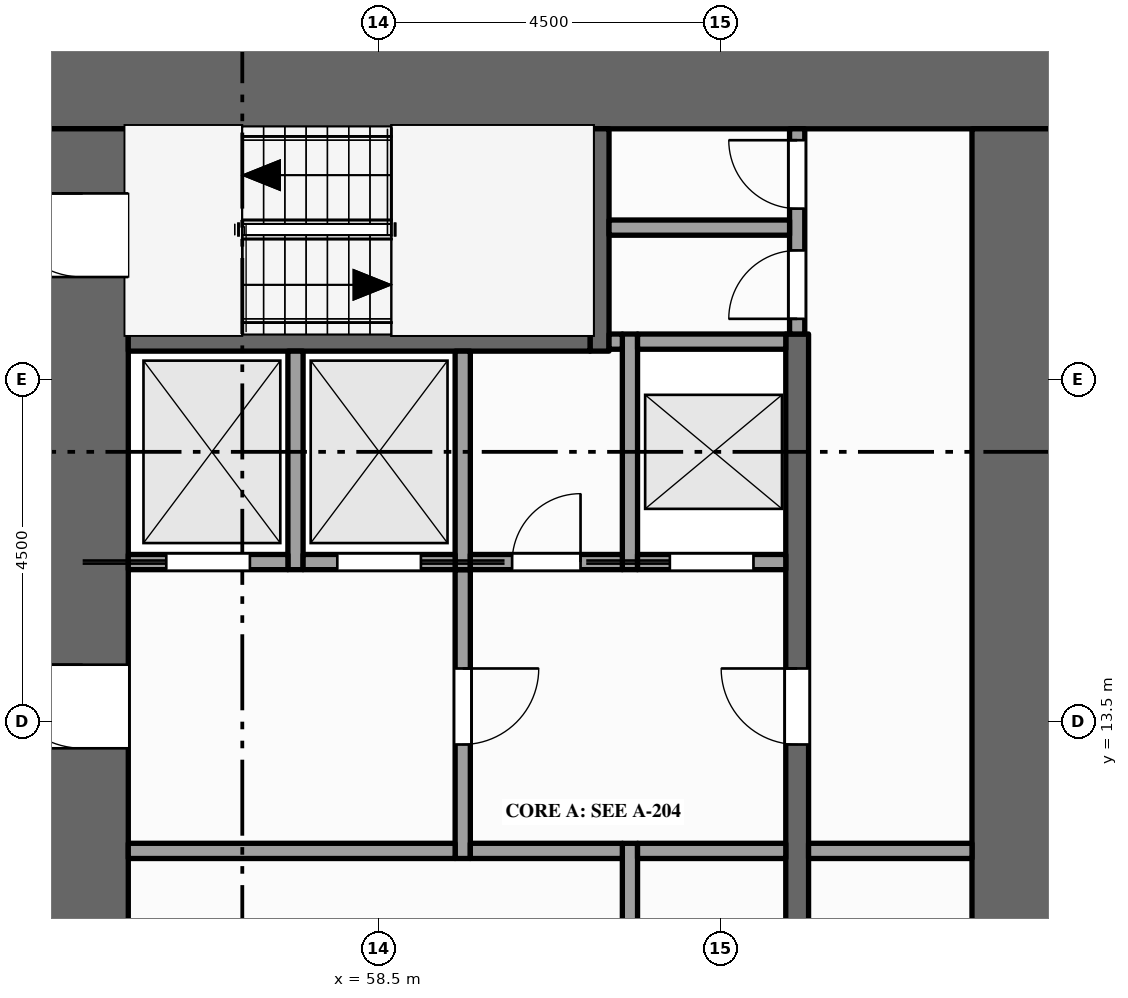
"""IFC4 building model, lengths in metres.
Left out: names, types, materials, properties, quantities, classifications, styles, units other than length and angle.
Written with IfcOpenShell. Run it as: python <this file> out.ifc"""

import sys

from ifc_helpers import new_model, si_unit, direction, frame, frame_2d, origin, place, context, subcontext, project, spatial, rectangle, extrude, element, fill, save


model = new_model("IFC4")
c1 = context("Model", 3, precision=1e-05, world=origin(), true_north=direction((0.0, 1.0)))
c2 = subcontext(c1, "Body", "Model", "MODEL_VIEW")
j1 = project(units=[si_unit("LENGTHUNIT", "METRE"), si_unit("PLANEANGLEUNIT", "RADIAN")], contexts=[c1])
p1 = place(None, origin())
s1 = spatial("IfcSite", under=j1, at=p1, CompositionType="ELEMENT")
p2 = place(p1, origin())
s2 = spatial("IfcBuilding", under=s1, at=p2, CompositionType="ELEMENT")
p3 = place(p2, frame((0.0, 0.0, 19.0)))
s3 = spatial("IfcBuildingStorey", under=s2, at=p3, CompositionType="ELEMENT", Elevation=19.0)
p4 = place(p3, frame((54.0, 21.9, -0.15), z_axis=(0.0, 0.0, 1.0), x_axis=(1.0, 0.0, 0.0)))
e1 = element("IfcWall", 1, at=p4, inside=s3, PredefinedType="SHEAR", context=c2, shape_type="SweptSolid", body=[
    extrude(rectangle(XDim=13.5, YDim=1.2, at=frame_2d((6.75, 0.0))), origin(), (0.0, 0.0, 1.0), 5.0),
])
p5 = place(p3, frame((54.6, 1.2, -0.15), z_axis=(0.0, 0.0, 1.0), x_axis=(0.0, 1.0, 0.0)))
e2 = element("IfcWall", 2, at=p5, inside=s3, PredefinedType="SHEAR", context=c2, shape_type="SweptSolid", body=[
    extrude(rectangle(XDim=20.1, YDim=1.2, at=frame_2d((10.05, 0.0))), origin(), (0.0, 0.0, 1.0), 5.0),
])
p6 = place(p5, frame((5.9, 0.0, 0.15)))
e3 = element("IfcOpeningElement", 3, at=p6, cuts=e2, PredefinedType="OPENING", context=c2, shape_type="SweptSolid", body=[
    extrude(rectangle(XDim=1.8, YDim=2.1, at=frame_2d((0.9, 1.05))), frame((0.0, 0.61, 0.0), z_axis=(0.0, -1.0, 0.0), x_axis=(1.0, 0.0, 0.0)), (0.0, 0.0, 1.0), 1.22),
])
p7 = place(p5, frame((11.95, 0.0, 0.15)))
e4 = element("IfcOpeningElement", 4, at=p7, cuts=e2, PredefinedType="OPENING", context=c2, shape_type="SweptSolid", body=[
    extrude(rectangle(XDim=1.1, YDim=2.1, at=frame_2d((0.55, 1.05))), frame((0.0, 0.61, 0.0), z_axis=(0.0, -1.0, 0.0), x_axis=(1.0, 0.0, 0.0)), (0.0, 0.0, 1.0), 1.22),
])
p8 = place(p5, frame((0.95, 0.0, 0.15)))
e5 = element("IfcOpeningElement", 5, at=p8, cuts=e2, PredefinedType="OPENING", context=c2, shape_type="SweptSolid", body=[
    extrude(rectangle(XDim=1.1, YDim=2.1, at=frame_2d((0.55, 1.05))), frame((0.0, 0.61, 0.0), z_axis=(0.0, -1.0, 0.0), x_axis=(1.0, 0.0, 0.0)), (0.0, 0.0, 1.0), 1.22),
])
p9 = place(p5, frame((18.15, 0.0, 0.15)))
e6 = element("IfcOpeningElement", 6, at=p9, cuts=e2, PredefinedType="OPENING", context=c2, shape_type="SweptSolid", body=[
    extrude(rectangle(XDim=1.1, YDim=2.1, at=frame_2d((0.55, 1.05))), frame((0.0, 0.61, 0.0), z_axis=(0.0, -1.0, 0.0), x_axis=(1.0, 0.0, 0.0)), (0.0, 0.0, 1.0), 1.22),
])
p10 = place(p3, frame((66.9, 1.2, -0.15), z_axis=(0.0, 0.0, 1.0), x_axis=(0.0, 1.0, 0.0)))
e7 = element("IfcWall", 7, at=p10, inside=s3, PredefinedType="SHEAR", context=c2, shape_type="SweptSolid", body=[
    extrude(rectangle(XDim=20.1, YDim=1.2, at=frame_2d((10.05, 0.0))), origin(), (0.0, 0.0, 1.0), 5.0),
])
p11 = place(p3, frame((57.4, 15.5, 0.0), z_axis=(0.0, 0.0, 1.0), x_axis=(0.0, 1.0, 0.0)))
e8 = element("IfcWall", 8, at=p11, inside=s3, PredefinedType="SOLIDWALL", context=c2, shape_type="SweptSolid", body=[
    extrude(rectangle(XDim=2.875, YDim=0.2, at=frame_2d((1.438, 0.0))), origin(), (0.0, 0.0, 1.0), 4.75),
])
p12 = place(p3, frame((59.6, 11.7, 0.0), z_axis=(0.0, 0.0, 1.0), x_axis=(0.0, 1.0, 0.0)))
e9 = element("IfcWall", 9, at=p12, inside=s3, PredefinedType="PARTITIONING", context=c2, shape_type="SweptSolid", body=[
    extrude(rectangle(XDim=3.8, YDim=0.2, at=frame_2d((1.9, 0.0))), origin(), (0.0, 0.0, 1.0), 4.75),
])
p13 = place(p12, frame((1.5, 0.0, 0.0)))
e10 = element("IfcOpeningElement", 10, at=p13, cuts=e9, PredefinedType="OPENING", context=c2, shape_type="SweptSolid", body=[
    extrude(rectangle(XDim=1.0, YDim=2.1, at=frame_2d((0.5, 1.05))), frame((0.0, 0.11, 0.0), z_axis=(0.0, -1.0, 0.0), x_axis=(1.0, 0.0, 0.0)), (0.0, 0.0, 1.0), 0.22),
])
p14 = place(p3, frame((59.6, 15.5, 0.0), z_axis=(0.0, 0.0, 1.0), x_axis=(0.0, 1.0, 0.0)))
e11 = element("IfcWall", 11, at=p14, inside=s3, PredefinedType="SOLIDWALL", context=c2, shape_type="SweptSolid", body=[
    extrude(rectangle(XDim=2.875, YDim=0.2, at=frame_2d((1.438, 0.0))), origin(), (0.0, 0.0, 1.0), 4.75),
])
p15 = place(p3, frame((61.4, 18.375, 0.0), z_axis=(0.0, 0.0, 1.0), x_axis=(0.0, 1.0, 0.0)))
e12 = element("IfcWall", 12, at=p15, inside=s3, PredefinedType="SHEAR", context=c2, shape_type="SweptSolid", body=[
    extrude(rectangle(XDim=2.925, YDim=0.25, at=frame_2d((1.462, 0.0))), origin(), (0.0, 0.0, 1.0), 4.75),
])
p16 = place(p3, frame((61.8, 9.3, 0.0), z_axis=(0.0, 0.0, 1.0), x_axis=(0.0, 1.0, 0.0)))
e13 = element("IfcWall", 13, at=p16, inside=s3, PredefinedType="PARTITIONING", context=c2, shape_type="SweptSolid", body=[
    extrude(rectangle(XDim=2.6, YDim=0.2, at=frame_2d((1.3, 0.0))), origin(), (0.0, 0.0, 1.0), 4.75),
])
p17 = place(p3, frame((61.8, 15.5, 0.0), z_axis=(0.0, 0.0, 1.0), x_axis=(0.0, 1.0, 0.0)))
e14 = element("IfcWall", 14, at=p17, inside=s3, PredefinedType="SOLIDWALL", context=c2, shape_type="SweptSolid", body=[
    extrude(rectangle(XDim=3.1, YDim=0.2, at=frame_2d((1.55, 0.0))), origin(), (0.0, 0.0, 1.0), 4.75),
])
p18 = place(p3, frame((64.0, 4.1, 0.0), z_axis=(0.0, 0.0, 1.0), x_axis=(0.0, 1.0, 0.0)))
e15 = element("IfcWall", 15, at=p18, inside=s3, PredefinedType="SHEAR", context=c2, shape_type="SweptSolid", body=[
    extrude(rectangle(XDim=14.5, YDim=0.3, at=frame_2d((7.25, 0.0))), origin(), (0.0, 0.0, 1.0), 4.75),
])
p19 = place(p18, frame((3.4, 0.0, 0.0)))
e16 = element("IfcOpeningElement", 16, at=p19, cuts=e15, PredefinedType="OPENING", context=c2, shape_type="SweptSolid", body=[
    extrude(rectangle(XDim=1.0, YDim=2.1, at=frame_2d((0.5, 1.05))), frame((0.0, 0.16, 0.0), z_axis=(0.0, -1.0, 0.0), x_axis=(1.0, 0.0, 0.0)), (0.0, 0.0, 1.0), 0.32),
])
p20 = place(p18, frame((9.1, 0.0, 0.0)))
e17 = element("IfcOpeningElement", 17, at=p20, cuts=e15, PredefinedType="OPENING", context=c2, shape_type="SweptSolid", body=[
    extrude(rectangle(XDim=1.0, YDim=2.1, at=frame_2d((0.5, 1.05))), frame((0.0, 0.16, 0.0), z_axis=(0.0, -1.0, 0.0), x_axis=(1.0, 0.0, 0.0)), (0.0, 0.0, 1.0), 0.32),
])
p21 = place(p3, frame((64.0, 18.6, 0.0), z_axis=(0.0, 0.0, 1.0), x_axis=(0.0, 1.0, 0.0)))
e18 = element("IfcWall", 18, at=p21, inside=s3, PredefinedType="PARTITIONING", context=c2, shape_type="SweptSolid", body=[
    extrude(rectangle(XDim=2.7, YDim=0.2, at=frame_2d((1.35, 0.0))), origin(), (0.0, 0.0, 1.0), 4.75),
])
p22 = place(p21, frame((0.2, 0.0, 0.0)))
e19 = element("IfcOpeningElement", 19, at=p22, cuts=e18, PredefinedType="OPENING", context=c2, shape_type="SweptSolid", body=[
    extrude(rectangle(XDim=0.9, YDim=2.1, at=frame_2d((0.45, 1.05))), frame((0.0, 0.11, 0.0), z_axis=(0.0, -1.0, 0.0), x_axis=(1.0, 0.0, 0.0)), (0.0, 0.0, 1.0), 0.22),
])
p23 = place(p21, frame((1.65, 0.0, 0.0)))
e20 = element("IfcOpeningElement", 20, at=p23, cuts=e18, PredefinedType="OPENING", context=c2, shape_type="SweptSolid", body=[
    extrude(rectangle(XDim=0.9, YDim=2.1, at=frame_2d((0.45, 1.05))), frame((0.0, 0.11, 0.0), z_axis=(0.0, -1.0, 0.0), x_axis=(1.0, 0.0, 0.0)), (0.0, 0.0, 1.0), 0.22),
])
p24 = place(p3, frame((55.2, 11.8, 0.0), z_axis=(0.0, 0.0, 1.0), x_axis=(1.0, 0.0, 0.0)))
e21 = element("IfcWall", 21, at=p24, inside=s3, PredefinedType="PARTITIONING", context=c2, shape_type="SweptSolid", body=[
    extrude(rectangle(XDim=4.3, YDim=0.2, at=frame_2d((2.15, 0.0))), origin(), (0.0, 0.0, 1.0), 4.75),
])
p25 = place(p3, frame((59.7, 11.8, 0.0), z_axis=(0.0, 0.0, 1.0), x_axis=(1.0, 0.0, 0.0)))
e22 = element("IfcWall", 22, at=p25, inside=s3, PredefinedType="PARTITIONING", context=c2, shape_type="SweptSolid", body=[
    extrude(rectangle(XDim=2.0, YDim=0.2, at=frame_2d((1.0, 0.0))), origin(), (0.0, 0.0, 1.0), 4.75),
])
p26 = place(p3, frame((61.9, 11.8, 0.0), z_axis=(0.0, 0.0, 1.0), x_axis=(1.0, 0.0, 0.0)))
e23 = element("IfcWall", 23, at=p26, inside=s3, PredefinedType="PARTITIONING", context=c2, shape_type="SweptSolid", body=[
    extrude(rectangle(XDim=1.95, YDim=0.2, at=frame_2d((0.975, 0.0))), origin(), (0.0, 0.0, 1.0), 4.75),
])
p27 = place(p3, frame((64.15, 11.8, 0.0), z_axis=(0.0, 0.0, 1.0), x_axis=(1.0, 0.0, 0.0)))
e24 = element("IfcWall", 24, at=p27, inside=s3, PredefinedType="PARTITIONING", context=c2, shape_type="SweptSolid", body=[
    extrude(rectangle(XDim=2.15, YDim=0.2, at=frame_2d((1.075, 0.0))), origin(), (0.0, 0.0, 1.0), 4.75),
])
p28 = place(p3, frame((55.2, 15.6, 0.0), z_axis=(0.0, 0.0, 1.0), x_axis=(1.0, 0.0, 0.0)))
e25 = element("IfcWall", 25, at=p28, inside=s3, PredefinedType="SOLIDWALL", context=c2, shape_type="SweptSolid", body=[
    extrude(rectangle(XDim=2.1, YDim=0.2, at=frame_2d((1.05, 0.0))), origin(), (0.0, 0.0, 1.0), 4.75),
])
p29 = place(p28, frame((0.5, 0.0, 0.012)))
e26 = element("IfcOpeningElement", 26, at=p29, cuts=e25, PredefinedType="OPENING", context=c2, shape_type="SweptSolid", body=[
    extrude(rectangle(XDim=1.1, YDim=2.1, at=frame_2d((0.55, 1.05))), frame((0.0, 0.11, 0.0), z_axis=(0.0, -1.0, 0.0), x_axis=(1.0, 0.0, 0.0)), (0.0, 0.0, 1.0), 0.22),
])
p30 = place(p3, frame((57.5, 15.6, 0.0), z_axis=(0.0, 0.0, 1.0), x_axis=(1.0, 0.0, 0.0)))
e27 = element("IfcWall", 27, at=p30, inside=s3, PredefinedType="SOLIDWALL", context=c2, shape_type="SweptSolid", body=[
    extrude(rectangle(XDim=2.0, YDim=0.2, at=frame_2d((1.0, 0.0))), origin(), (0.0, 0.0, 1.0), 4.75),
])
p31 = place(p30, frame((0.45, 0.0, 0.012)))
e28 = element("IfcOpeningElement", 28, at=p31, cuts=e27, PredefinedType="OPENING", context=c2, shape_type="SweptSolid", body=[
    extrude(rectangle(XDim=1.1, YDim=2.1, at=frame_2d((0.55, 1.05))), frame((0.0, 0.11, 0.0), z_axis=(0.0, -1.0, 0.0), x_axis=(1.0, 0.0, 0.0)), (0.0, 0.0, 1.0), 0.22),
])
p32 = place(p3, frame((59.7, 15.6, 0.0), z_axis=(0.0, 0.0, 1.0), x_axis=(1.0, 0.0, 0.0)))
e29 = element("IfcWall", 29, at=p32, inside=s3, PredefinedType="PARTITIONING", context=c2, shape_type="SweptSolid", body=[
    extrude(rectangle(XDim=2.0, YDim=0.2, at=frame_2d((1.0, 0.0))), origin(), (0.0, 0.0, 1.0), 4.75),
])
p33 = place(p32, frame((0.55, 0.0, 0.0)))
e30 = element("IfcOpeningElement", 30, at=p33, cuts=e29, PredefinedType="OPENING", context=c2, shape_type="SweptSolid", body=[
    extrude(rectangle(XDim=0.9, YDim=2.1, at=frame_2d((0.45, 1.05))), frame((0.0, 0.11, 0.0), z_axis=(0.0, -1.0, 0.0), x_axis=(1.0, 0.0, 0.0)), (0.0, 0.0, 1.0), 0.22),
])
p34 = place(p3, frame((61.9, 15.6, 0.0), z_axis=(0.0, 0.0, 1.0), x_axis=(1.0, 0.0, 0.0)))
e31 = element("IfcWall", 31, at=p34, inside=s3, PredefinedType="SOLIDWALL", context=c2, shape_type="SweptSolid", body=[
    extrude(rectangle(XDim=1.95, YDim=0.2, at=frame_2d((0.975, 0.0))), origin(), (0.0, 0.0, 1.0), 4.75),
])
p35 = place(p34, frame((0.425, 0.0, 0.012)))
e32 = element("IfcOpeningElement", 32, at=p35, cuts=e31, PredefinedType="OPENING", context=c2, shape_type="SweptSolid", body=[
    extrude(rectangle(XDim=1.1, YDim=2.1, at=frame_2d((0.55, 1.05))), frame((0.0, 0.11, 0.0), z_axis=(0.0, -1.0, 0.0), x_axis=(1.0, 0.0, 0.0)), (0.0, 0.0, 1.0), 0.22),
])
p36 = place(p3, frame((55.2, 18.5, 0.0), z_axis=(0.0, 0.0, 1.0), x_axis=(1.0, 0.0, 0.0)))
e33 = element("IfcWall", 33, at=p36, inside=s3, PredefinedType="SHEAR", context=c2, shape_type="SweptSolid", body=[
    extrude(rectangle(XDim=6.075, YDim=0.25, at=frame_2d((3.038, 0.0))), origin(), (0.0, 0.0, 1.0), 4.75),
])
p37 = place(p3, frame((61.525, 18.5, 0.0), z_axis=(0.0, 0.0, 1.0), x_axis=(1.0, 0.0, 0.0)))
e34 = element("IfcWall", 34, at=p37, inside=s3, PredefinedType="PARTITIONING", context=c2, shape_type="SweptSolid", body=[
    extrude(rectangle(XDim=0.175, YDim=0.2, at=frame_2d((0.087, 0.0))), origin(), (0.0, 0.0, 1.0), 4.75),
])
p38 = place(p3, frame((61.9, 18.5, 0.0), z_axis=(0.0, 0.0, 1.0), x_axis=(1.0, 0.0, 0.0)))
e35 = element("IfcWall", 35, at=p38, inside=s3, PredefinedType="SOLIDWALL", context=c2, shape_type="SweptSolid", body=[
    extrude(rectangle(XDim=1.95, YDim=0.2, at=frame_2d((0.975, 0.0))), origin(), (0.0, 0.0, 1.0), 4.75),
])
p39 = place(p3, frame((61.525, 20.0, 0.0), z_axis=(0.0, 0.0, 1.0), x_axis=(1.0, 0.0, 0.0)))
e36 = element("IfcWall", 36, at=p39, inside=s3, PredefinedType="PARTITIONING", context=c2, shape_type="SweptSolid", body=[
    extrude(rectangle(XDim=2.375, YDim=0.2, at=frame_2d((1.188, 0.0))), origin(), (0.0, 0.0, 1.0), 4.75),
])
p40 = place(p29, origin())
e37 = element("IfcDoor", 37, at=p40, inside=s3, OperationType="SLIDING_TO_LEFT", PredefinedType="DOOR", context=c2, shape_type="SweptSolid", body=[
    extrude(rectangle(XDim=1.1, YDim=2.1, at=frame_2d((0.55, 1.05))), frame((0.0, 0.025, 0.0), z_axis=(0.0, -1.0, 0.0), x_axis=(1.0, 0.0, 0.0)), (0.0, 0.0, 1.0), 0.05),
])
fill(e26, e37)
p41 = place(p31, origin())
e38 = element("IfcDoor", 38, at=p41, inside=s3, OperationType="SLIDING_TO_RIGHT", PredefinedType="DOOR", context=c2, shape_type="SweptSolid", body=[
    extrude(rectangle(XDim=1.1, YDim=2.1, at=frame_2d((0.55, 1.05))), frame((0.0, 0.025, 0.0), z_axis=(0.0, -1.0, 0.0), x_axis=(1.0, 0.0, 0.0)), (0.0, 0.0, 1.0), 0.05),
])
fill(e28, e38)
p42 = place(p35, origin())
e39 = element("IfcDoor", 39, at=p42, inside=s3, OperationType="SLIDING_TO_LEFT", PredefinedType="DOOR", context=c2, shape_type="SweptSolid", body=[
    extrude(rectangle(XDim=1.1, YDim=2.1, at=frame_2d((0.55, 1.05))), frame((0.0, 0.025, 0.0), z_axis=(0.0, -1.0, 0.0), x_axis=(1.0, 0.0, 0.0)), (0.0, 0.0, 1.0), 0.05),
])
fill(e32, e39)
p43 = place(p7, origin())
e40 = element("IfcDoor", 40, at=p43, inside=s3, OperationType="SINGLE_SWING_RIGHT", PredefinedType="DOOR", context=c2, shape_type="SweptSolid", body=[
    extrude(rectangle(XDim=1.1, YDim=2.1, at=frame_2d((0.55, 1.05))), frame((0.0, 0.025, 0.0), z_axis=(0.0, -1.0, 0.0), x_axis=(1.0, 0.0, 0.0)), (0.0, 0.0, 1.0), 0.05),
])
fill(e4, e40)
p44 = place(p13, origin())
e41 = element("IfcDoor", 41, at=p44, inside=s3, OperationType="SINGLE_SWING_RIGHT", PredefinedType="DOOR", context=c2, shape_type="SweptSolid", body=[
    extrude(rectangle(XDim=1.0, YDim=2.1, at=frame_2d((0.5, 1.05))), frame((0.0, 0.025, 0.0), z_axis=(0.0, -1.0, 0.0), x_axis=(1.0, 0.0, 0.0)), (0.0, 0.0, 1.0), 0.05),
])
fill(e10, e41)
p45 = place(p20, origin())
e42 = element("IfcDoor", 42, at=p45, inside=s3, OperationType="SINGLE_SWING_RIGHT", PredefinedType="DOOR", context=c2, shape_type="SweptSolid", body=[
    extrude(rectangle(XDim=1.0, YDim=2.1, at=frame_2d((0.5, 1.05))), frame((0.0, 0.025, 0.0), z_axis=(0.0, -1.0, 0.0), x_axis=(1.0, 0.0, 0.0)), (0.0, 0.0, 1.0), 0.05),
])
fill(e17, e42)
p46 = place(p9, origin())
e43 = element("IfcDoor", 43, at=p46, inside=s3, OperationType="SINGLE_SWING_RIGHT", PredefinedType="DOOR", context=c2, shape_type="SweptSolid", body=[
    extrude(rectangle(XDim=1.1, YDim=2.1, at=frame_2d((0.55, 1.05))), frame((0.0, 0.025, 0.0), z_axis=(0.0, -1.0, 0.0), x_axis=(1.0, 0.0, 0.0)), (0.0, 0.0, 1.0), 0.05),
])
fill(e6, e43)
p47 = place(p22, origin())
e44 = element("IfcDoor", 44, at=p47, inside=s3, OperationType="SINGLE_SWING_LEFT", PredefinedType="DOOR", context=c2, shape_type="SweptSolid", body=[
    extrude(rectangle(XDim=0.9, YDim=2.1, at=frame_2d((0.45, 1.05))), frame((0.0, 0.025, 0.0), z_axis=(0.0, -1.0, 0.0), x_axis=(1.0, 0.0, 0.0)), (0.0, 0.0, 1.0), 0.05),
])
fill(e19, e44)
p48 = place(p23, origin())
e45 = element("IfcDoor", 45, at=p48, inside=s3, OperationType="SINGLE_SWING_RIGHT", PredefinedType="DOOR", context=c2, shape_type="SweptSolid", body=[
    extrude(rectangle(XDim=0.9, YDim=2.1, at=frame_2d((0.45, 1.05))), frame((0.0, 0.025, 0.0), z_axis=(0.0, -1.0, 0.0), x_axis=(1.0, 0.0, 0.0)), (0.0, 0.0, 1.0), 0.05),
])
fill(e20, e45)
p49 = place(p33, origin())
e46 = element("IfcDoor", 46, at=p49, inside=s3, OperationType="SINGLE_SWING_RIGHT", PredefinedType="DOOR", context=c2, shape_type="SweptSolid", body=[
    extrude(rectangle(XDim=0.9, YDim=2.1, at=frame_2d((0.45, 1.05))), frame((0.0, 0.025, 0.0), z_axis=(0.0, -1.0, 0.0), x_axis=(1.0, 0.0, 0.0)), (0.0, 0.0, 1.0), 0.05),
])
fill(e30, e46)
save(model, sys.argv[1])
